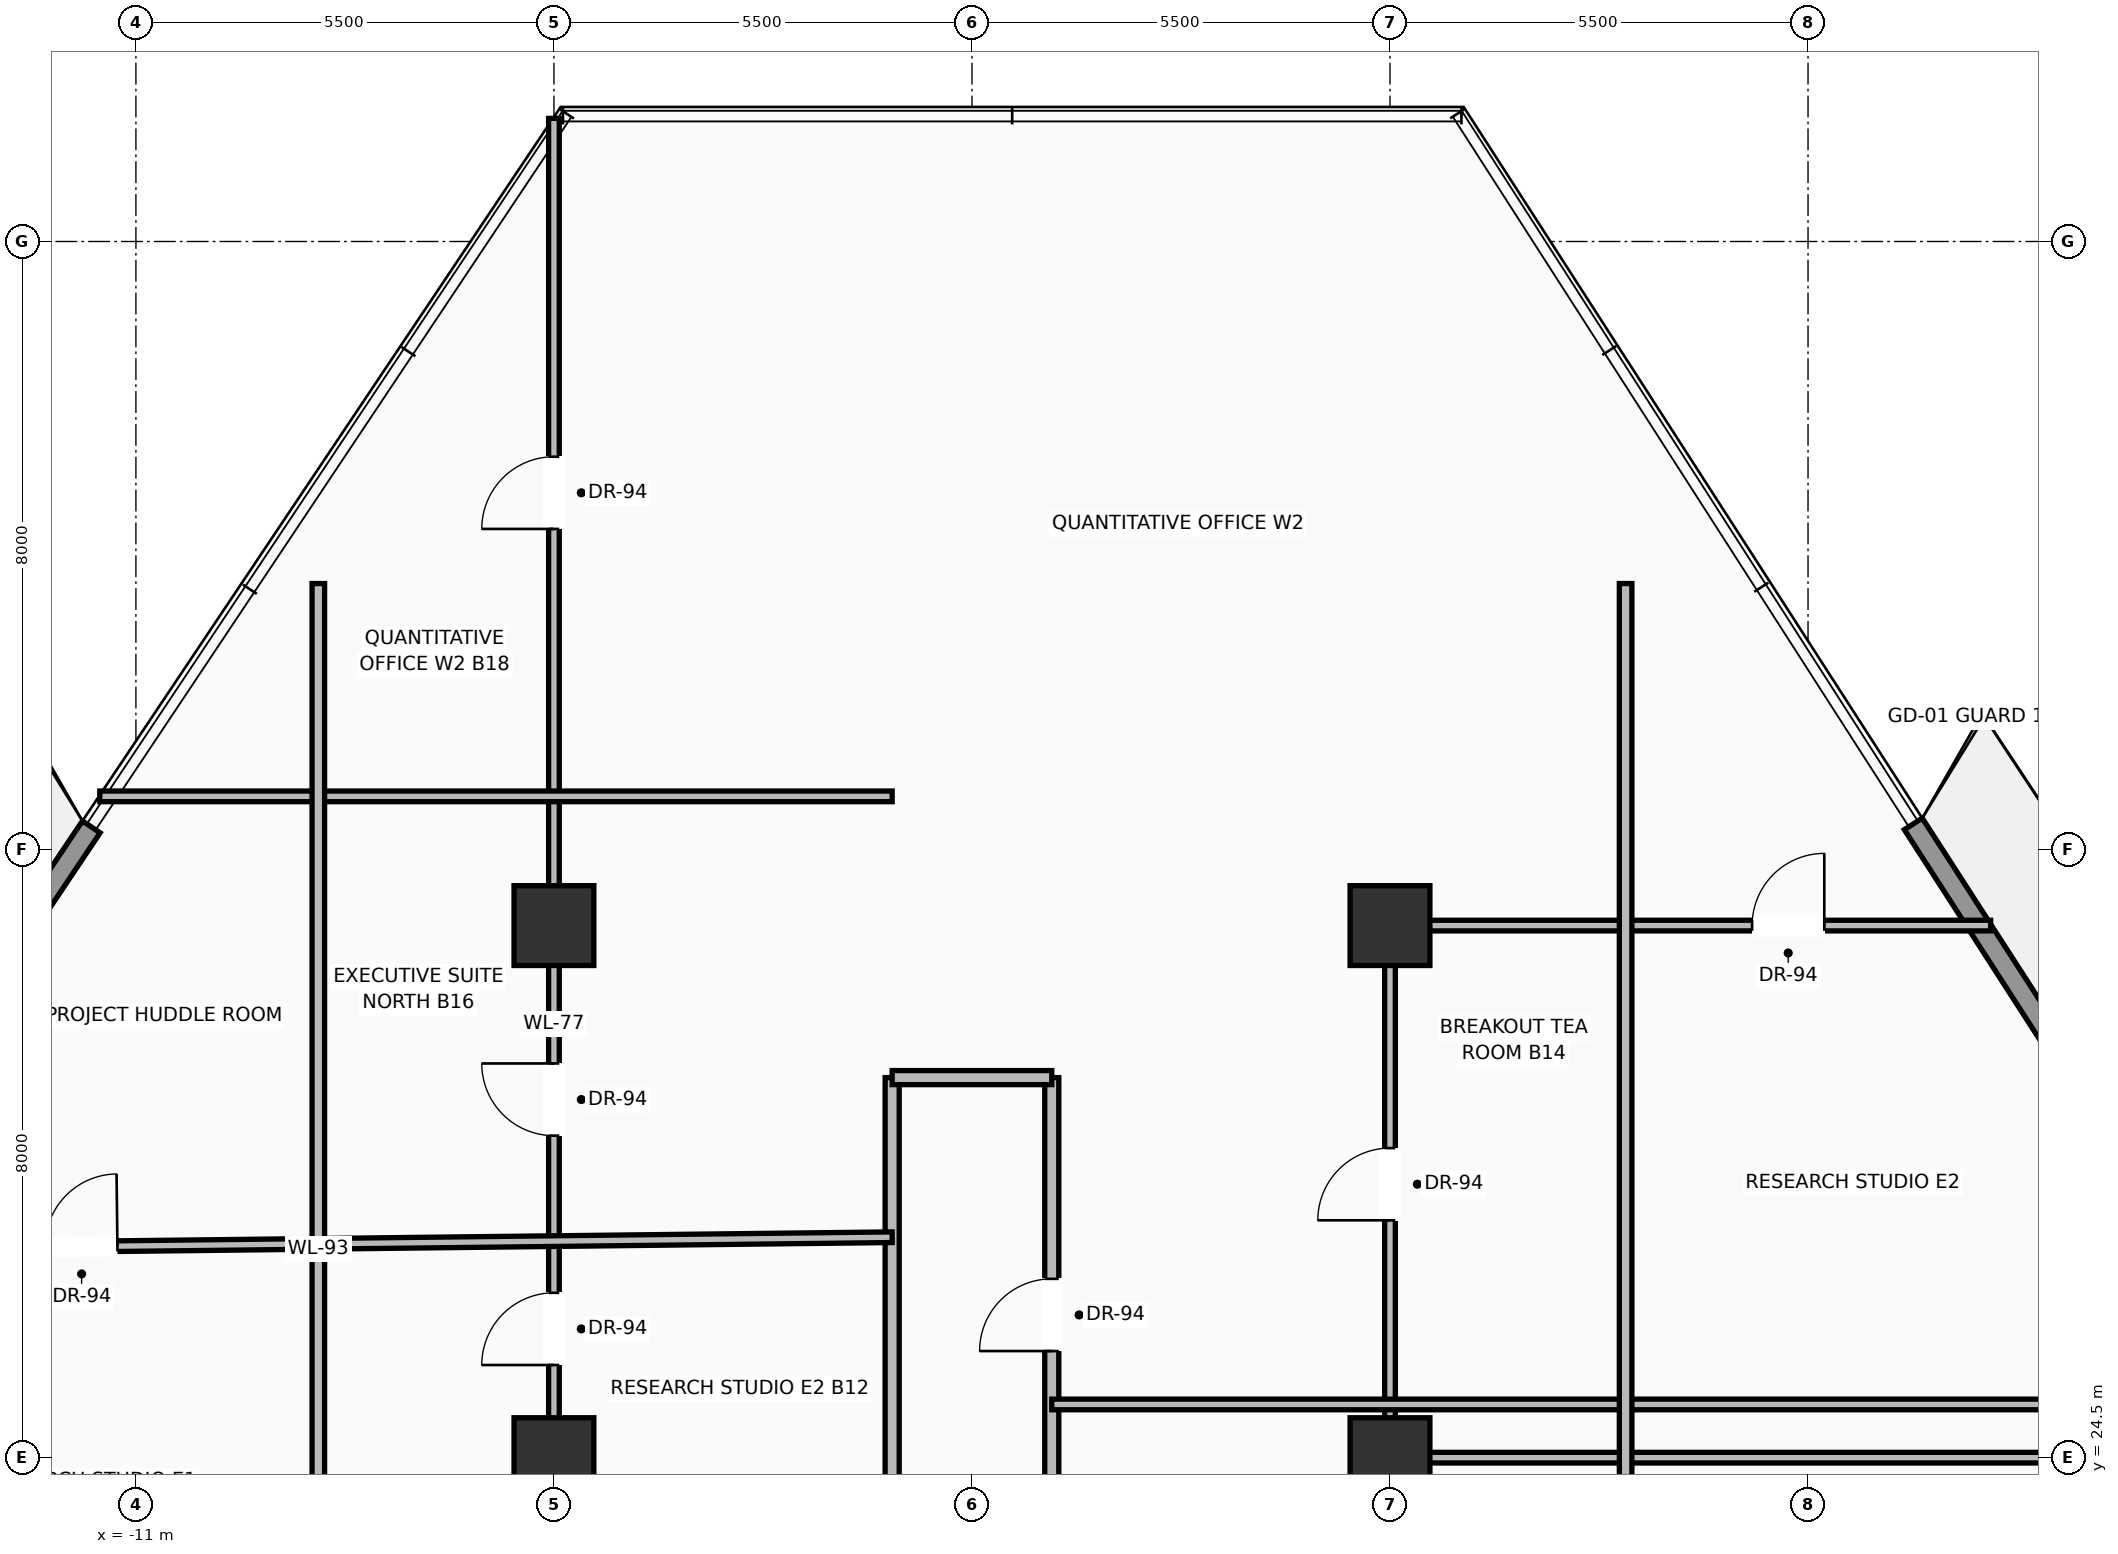
"""IFC4 building model, lengths in metres.
Left out: names, types, materials, properties, quantities, classifications, styles, units other than length and angle.
Written with IfcOpenShell. Run it as: python <this file> out.ifc"""

import sys

from ifc_helpers import new_model, si_unit, direction, frame, frame_2d, origin, origin_2d, place, context, subcontext, project, spatial, rectangle, extrude, source, transform, mapped, element, fill, save


model = new_model("IFC4")
c1 = context("Model", 3, precision=1e-05, world=origin(), true_north=direction((0.0, 1.0)))
c2 = subcontext(c1, "Body", "Model", "MODEL_VIEW")
j1 = project(units=[si_unit("LENGTHUNIT", "METRE"), si_unit("PLANEANGLEUNIT", "RADIAN")], contexts=[c1])
p1 = place(None, origin())
s1 = spatial("IfcSite", under=j1, at=p1, CompositionType="ELEMENT")
p2 = place(p1, origin())
s2 = spatial("IfcBuilding", under=s1, at=p2, CompositionType="ELEMENT")
p3 = place(p2, frame((0.0, 0.0, 102.5)))
s3 = spatial("IfcBuildingStorey", under=s2, at=p3, CompositionType="ELEMENT", Elevation=102.5)
m1 = source(origin(), c2, "Body", "SweptSolid", [
    extrude(rectangle(XDim=1.05, YDim=1.05, at=origin_2d()), origin(), (0.0, 0.0, 1.0), 3.7),
])
for number, where, z_axis, x_axis in (
    (1, (-5.5, 24.5, 0.0), (0.0, 0.0, 1.0), (1.0, 0.0, 0.0)),
    (2, (5.5, 24.5, 0.0), (0.0, 0.0, 1.0), (1.0, 0.0, 0.0)),
    (3, (-5.5, 31.5, 0.0), (0.0, 0.0, 1.0), (1.0, 0.0, 0.0)),
    (4, (5.5, 31.5, 0.0), (0.0, 0.0, 1.0), (1.0, 0.0, 0.0)),
):
    element("IfcColumn", number, at=place(p3, frame(where, z_axis=z_axis, x_axis=x_axis)), inside=s3, PredefinedType="COLUMN", context=c2, shape_type="MappedRepresentation", body=[
        mapped(m1, transform((0.0, 0.0, 0.0), scale=1.0)),
    ])
p4 = place(p3, frame((-21.475, 18.038, 0.0), z_axis=(0.0, 0.0, 1.0), x_axis=(0.556538112224, 0.830822080618, 0.0)))
e5 = element("IfcWall", 5, at=p4, inside=s3, PredefinedType="SOLIDWALL", context=c2, shape_type="SweptSolid", body=[
    extrude(rectangle(XDim=17.766, YDim=0.28, at=frame_2d((8.883, 0.0))), origin(), (0.0, 0.0, 1.0), 3.03),
])
p5 = place(p4, frame((4.264, 0.0, 0.0)))
e6 = element("IfcOpeningElement", 6, at=p5, cuts=e5, PredefinedType="OPENING", context=c2, shape_type="SweptSolid", body=[
    extrude(rectangle(XDim=1.6, YDim=2.35, at=frame_2d((0.8, 1.175))), frame((0.0, 0.15, 0.0), z_axis=(0.0, -1.0, 0.0), x_axis=(1.0, 0.0, 0.0)), (0.0, 0.0, 1.0), 0.3),
])
p6 = place(p4, frame((12.081, 0.0, 0.9)))
e7 = element("IfcOpeningElement", 7, at=p6, cuts=e5, PredefinedType="OPENING", context=c2, shape_type="SweptSolid", body=[
    extrude(rectangle(XDim=1.55, YDim=1.85, at=frame_2d((0.775, 0.925))), frame((0.0, 0.15, 0.0), z_axis=(0.0, -1.0, 0.0), x_axis=(1.0, 0.0, 0.0)), (0.0, 0.0, 1.0), 0.3),
])
p7 = place(p3, frame((12.385, 32.838, 0.0), z_axis=(0.0, 0.0, 1.0), x_axis=(0.541927229755, -0.840425414686, 0.0)))
e8 = element("IfcWall", 8, at=p7, inside=s3, PredefinedType="SOLIDWALL", context=c2, shape_type="SweptSolid", body=[
    extrude(rectangle(XDim=17.494, YDim=0.28, at=frame_2d((8.747, 0.0))), origin(), (0.0, 0.0, 1.0), 3.03),
])
p8 = place(p7, frame((4.198, 0.0, 0.0)))
e9 = element("IfcOpeningElement", 9, at=p8, cuts=e8, PredefinedType="OPENING", context=c2, shape_type="SweptSolid", body=[
    extrude(rectangle(XDim=1.6, YDim=2.35, at=frame_2d((0.8, 1.175))), frame((0.0, 0.15, 0.0), z_axis=(0.0, -1.0, 0.0), x_axis=(1.0, 0.0, 0.0)), (0.0, 0.0, 1.0), 0.3),
])
p9 = place(p7, frame((11.896, 0.0, 0.9)))
e10 = element("IfcOpeningElement", 10, at=p9, cuts=e8, PredefinedType="OPENING", context=c2, shape_type="SweptSolid", body=[
    extrude(rectangle(XDim=1.55, YDim=1.85, at=frame_2d((0.775, 0.925))), frame((0.0, 0.15, 0.0), z_axis=(0.0, -1.0, 0.0), x_axis=(1.0, 0.0, 0.0)), (0.0, 0.0, 1.0), 0.3),
])
p10 = place(p3, frame((-1.05, 18.5, 0.0), z_axis=(0.0, 0.0, 1.0), x_axis=(0.0, 1.0, 0.0)))
e11 = element("IfcWall", 11, at=p10, inside=s3, PredefinedType="PARTITIONING", context=c2, shape_type="SweptSolid", body=[
    extrude(rectangle(XDim=11.0, YDim=0.185, at=frame_2d((5.5, 0.0))), origin(), (0.0, 0.0, 1.0), 2.747),
])
p11 = place(p10, frame((3.58, 0.0, 0.0)))
e12 = element("IfcOpeningElement", 12, at=p11, cuts=e11, PredefinedType="OPENING", context=c2, shape_type="SweptSolid", body=[
    extrude(rectangle(XDim=0.95, YDim=2.2, at=frame_2d((0.475, 1.1))), frame((0.0, 0.103, 0.0), z_axis=(0.0, -1.0, 0.0), x_axis=(1.0, 0.0, 0.0)), (0.0, 0.0, 1.0), 0.205),
])
p12 = place(p3, frame((1.05, 18.5, 0.0), z_axis=(0.0, 0.0, 1.0), x_axis=(0.0, 1.0, 0.0)))
e13 = element("IfcWall", 13, at=p12, inside=s3, PredefinedType="PARTITIONING", context=c2, shape_type="SweptSolid", body=[
    extrude(rectangle(XDim=11.0, YDim=0.185, at=frame_2d((5.5, 0.0))), origin(), (0.0, 0.0, 1.0), 2.747),
])
p13 = place(p12, frame((7.403, 0.0, 0.0)))
e14 = element("IfcOpeningElement", 14, at=p13, cuts=e13, PredefinedType="OPENING", context=c2, shape_type="SweptSolid", body=[
    extrude(rectangle(XDim=0.95, YDim=2.2, at=frame_2d((0.475, 1.1))), frame((0.0, 0.103, 0.0), z_axis=(0.0, -1.0, 0.0), x_axis=(1.0, 0.0, 0.0)), (0.0, 0.0, 1.0), 0.205),
])
p14 = place(p3, frame((-1.05, 29.5, 0.0), z_axis=(0.0, 0.0, 1.0), x_axis=(1.0, 0.0, 0.0)))
e15 = element("IfcWall", 15, at=p14, inside=s3, PredefinedType="PARTITIONING", context=c2, shape_type="SweptSolid", body=[
    extrude(rectangle(XDim=2.1, YDim=0.185, at=frame_2d((1.05, 0.0))), origin(), (0.0, 0.0, 1.0), 3.442),
])
p15 = place(p3, frame((-5.5, 18.3, 0.0), z_axis=(0.0, 0.0, 1.0), x_axis=(0.0, 1.0, 0.0)))
e16 = element("IfcWall", 16, at=p15, inside=s3, PredefinedType="PARTITIONING", context=c2, shape_type="SweptSolid", body=[
    extrude(rectangle(XDim=23.82, YDim=0.14, at=frame_2d((11.91, 0.0))), origin(), (0.0, 0.0, 1.0), 2.747),
])
p16 = place(p15, frame((7.419, 0.0, 0.0)))
e17 = element("IfcOpeningElement", 17, at=p16, cuts=e16, PredefinedType="OPENING", context=c2, shape_type="SweptSolid", body=[
    extrude(rectangle(XDim=0.95, YDim=2.2, at=frame_2d((0.475, 1.1))), frame((0.0, 0.08, 0.0), z_axis=(0.0, -1.0, 0.0), x_axis=(1.0, 0.0, 0.0)), (0.0, 0.0, 1.0), 0.16),
])
p17 = place(p15, frame((10.436, 0.0, 0.0)))
e18 = element("IfcOpeningElement", 18, at=p17, cuts=e16, PredefinedType="OPENING", context=c2, shape_type="SweptSolid", body=[
    extrude(rectangle(XDim=0.95, YDim=2.2, at=frame_2d((0.475, 1.1))), frame((0.0, 0.08, 0.0), z_axis=(0.0, -1.0, 0.0), x_axis=(1.0, 0.0, 0.0)), (0.0, 0.0, 1.0), 0.16),
])
p18 = place(p15, frame((18.418, 0.0, 0.0)))
e19 = element("IfcOpeningElement", 19, at=p18, cuts=e16, PredefinedType="OPENING", context=c2, shape_type="SweptSolid", body=[
    extrude(rectangle(XDim=0.95, YDim=2.2, at=frame_2d((0.475, 1.1))), frame((0.0, 0.08, 0.0), z_axis=(0.0, -1.0, 0.0), x_axis=(1.0, 0.0, 0.0)), (0.0, 0.0, 1.0), 0.16),
])
p19 = place(p3, frame((5.5, 24.5, 0.0), z_axis=(0.0, 0.0, 1.0), x_axis=(1.0, 0.0, 0.0)))
e20 = element("IfcWall", 20, at=p19, inside=s3, PredefinedType="PARTITIONING", context=c2, shape_type="SweptSolid", body=[
    extrude(rectangle(XDim=12.417, YDim=0.14, at=frame_2d((6.208, 0.0))), origin(), (0.0, 0.0, 1.0), 2.747),
])
p20 = place(p3, frame((5.5, 24.5, 0.0), z_axis=(0.0, 0.0, 1.0), x_axis=(0.0, 1.0, 0.0)))
e21 = element("IfcWall", 21, at=p20, inside=s3, PredefinedType="PARTITIONING", context=c2, shape_type="SweptSolid", body=[
    extrude(rectangle(XDim=7.0, YDim=0.14, at=frame_2d((3.5, 0.0))), origin(), (0.0, 0.0, 1.0), 2.747),
])
p21 = place(p20, frame((3.123, 0.0, 0.0)))
e22 = element("IfcOpeningElement", 22, at=p21, cuts=e21, PredefinedType="OPENING", context=c2, shape_type="SweptSolid", body=[
    extrude(rectangle(XDim=0.95, YDim=2.2, at=frame_2d((0.475, 1.1))), frame((0.0, 0.08, 0.0), z_axis=(0.0, -1.0, 0.0), x_axis=(1.0, 0.0, 0.0)), (0.0, 0.0, 1.0), 0.16),
])
p22 = place(p3, frame((5.5, 31.5, 0.0), z_axis=(0.0, 0.0, 1.0), x_axis=(1.0, 0.0, 0.0)))
e23 = element("IfcWall", 23, at=p22, inside=s3, PredefinedType="PARTITIONING", context=c2, shape_type="SweptSolid", body=[
    extrude(rectangle(XDim=7.903, YDim=0.14, at=frame_2d((3.951, 0.0))), origin(), (0.0, 0.0, 1.0), 2.747),
])
p23 = place(p22, frame((4.764, 0.0, 0.0)))
e24 = element("IfcOpeningElement", 24, at=p23, cuts=e23, PredefinedType="OPENING", context=c2, shape_type="SweptSolid", body=[
    extrude(rectangle(XDim=0.95, YDim=2.2, at=frame_2d((0.475, 1.1))), frame((0.0, 0.08, 0.0), z_axis=(0.0, -1.0, 0.0), x_axis=(1.0, 0.0, 0.0)), (0.0, 0.0, 1.0), 0.16),
])
p24 = place(p3, frame((-15.472, 27.234, 0.0), z_axis=(0.0, 0.0, 1.0), x_axis=(0.999933748453, 0.011510808162, 0.0)))
e25 = element("IfcWall", 25, at=p24, inside=s3, PredefinedType="PARTITIONING", context=c2, shape_type="SweptSolid", body=[
    extrude(rectangle(XDim=14.423, YDim=0.14, at=frame_2d((7.211, 0.0))), origin(), (0.0, 0.0, 1.0), 2.747),
])
p25 = place(p24, frame((3.278, 0.0, 0.0)))
e26 = element("IfcOpeningElement", 26, at=p25, cuts=e25, PredefinedType="OPENING", context=c2, shape_type="SweptSolid", body=[
    extrude(rectangle(XDim=0.95, YDim=2.2, at=frame_2d((0.475, 1.1))), frame((0.0, 0.08, 0.0), z_axis=(0.0, -1.0, 0.0), x_axis=(1.0, 0.0, 0.0)), (0.0, 0.0, 1.0), 0.16),
])
p26 = place(p3, frame((-11.475, 33.2, 0.0), z_axis=(0.0, 0.0, 1.0), x_axis=(1.0, 0.0, 0.0)))
e27 = element("IfcWall", 27, at=p26, inside=s3, PredefinedType="PARTITIONING", context=c2, shape_type="SweptSolid", body=[
    extrude(rectangle(XDim=10.425, YDim=0.14, at=frame_2d((5.212, 0.0))), origin(), (0.0, 0.0, 1.0), 2.747),
])
p27 = place(p3, frame((1.05, 25.2, 0.0), z_axis=(0.0, 0.0, 1.0), x_axis=(1.0, 0.0, 0.0)))
e28 = element("IfcWall", 28, at=p27, inside=s3, PredefinedType="PARTITIONING", context=c2, shape_type="SweptSolid", body=[
    extrude(rectangle(XDim=16.415, YDim=0.14, at=frame_2d((8.208, 0.0))), origin(), (0.0, 0.0, 1.0), 2.747),
])
for number, where, z_axis, x_axis in (
    (29, (-8.6, 18.5, 0.0), (0.0, 0.0, 1.0), (0.0, 1.0, 0.0)),
    (30, (8.6, 18.5, 0.0), (0.0, 0.0, 1.0), (0.0, 1.0, 0.0)),
):
    element("IfcWall", number, at=place(p3, frame(where, z_axis=z_axis, x_axis=x_axis)), inside=s3, PredefinedType="PARTITIONING", context=c2, shape_type="SweptSolid", body=[
        extrude(rectangle(XDim=17.5, YDim=0.165, at=frame_2d((8.75, 0.0))), origin(), (0.0, 0.0, 1.0), 2.747),
    ])
m2 = source(origin(), c2, "Body", "SweptSolid", [
    extrude(rectangle(XDim=0.95, YDim=2.2, at=frame_2d((0.475, 1.1))), frame((0.0, 0.025, 0.0), z_axis=(0.0, -1.0, 0.0), x_axis=(1.0, 0.0, 0.0)), (0.0, 0.0, 1.0), 0.05),
])
p28 = place(p13, origin())
e31 = element("IfcDoor", 31, at=p28, inside=s3, OperationType="SINGLE_SWING_LEFT", PredefinedType="DOOR", context=c2, shape_type="MappedRepresentation", body=[
    mapped(m2, transform((0.0, 0.0, 0.0), scale=1.0)),
])
fill(e14, e31)
p29 = place(p16, origin())
e32 = element("IfcDoor", 32, at=p29, inside=s3, OperationType="SINGLE_SWING_LEFT", PredefinedType="DOOR", context=c2, shape_type="MappedRepresentation", body=[
    mapped(m2, transform((0.0, 0.0, 0.0), scale=1.0)),
])
fill(e17, e32)
p30 = place(p23, origin())
e33 = element("IfcDoor", 33, at=p30, inside=s3, OperationType="SINGLE_SWING_RIGHT", PredefinedType="DOOR", context=c2, shape_type="MappedRepresentation", body=[
    mapped(m2, transform((0.0, 0.0, 0.0), scale=1.0)),
])
fill(e24, e33)
p31 = place(p21, origin())
e34 = element("IfcDoor", 34, at=p31, inside=s3, OperationType="SINGLE_SWING_LEFT", PredefinedType="DOOR", context=c2, shape_type="MappedRepresentation", body=[
    mapped(m2, transform((0.0, 0.0, 0.0), scale=1.0)),
])
fill(e22, e34)
p32 = place(p17, origin())
e35 = element("IfcDoor", 35, at=p32, inside=s3, OperationType="SINGLE_SWING_RIGHT", PredefinedType="DOOR", context=c2, shape_type="MappedRepresentation", body=[
    mapped(m2, transform((0.0, 0.0, 0.0), scale=1.0)),
])
fill(e18, e35)
p33 = place(p18, origin())
e36 = element("IfcDoor", 36, at=p33, inside=s3, OperationType="SINGLE_SWING_LEFT", PredefinedType="DOOR", context=c2, shape_type="MappedRepresentation", body=[
    mapped(m2, transform((0.0, 0.0, 0.0), scale=1.0)),
])
fill(e19, e36)
p34 = place(p25, origin())
e37 = element("IfcDoor", 37, at=p34, inside=s3, OperationType="SINGLE_SWING_RIGHT", PredefinedType="DOOR", context=c2, shape_type="MappedRepresentation", body=[
    mapped(m2, transform((0.0, 0.0, 0.0), scale=1.0)),
])
fill(e26, e37)
save(model, sys.argv[1])
